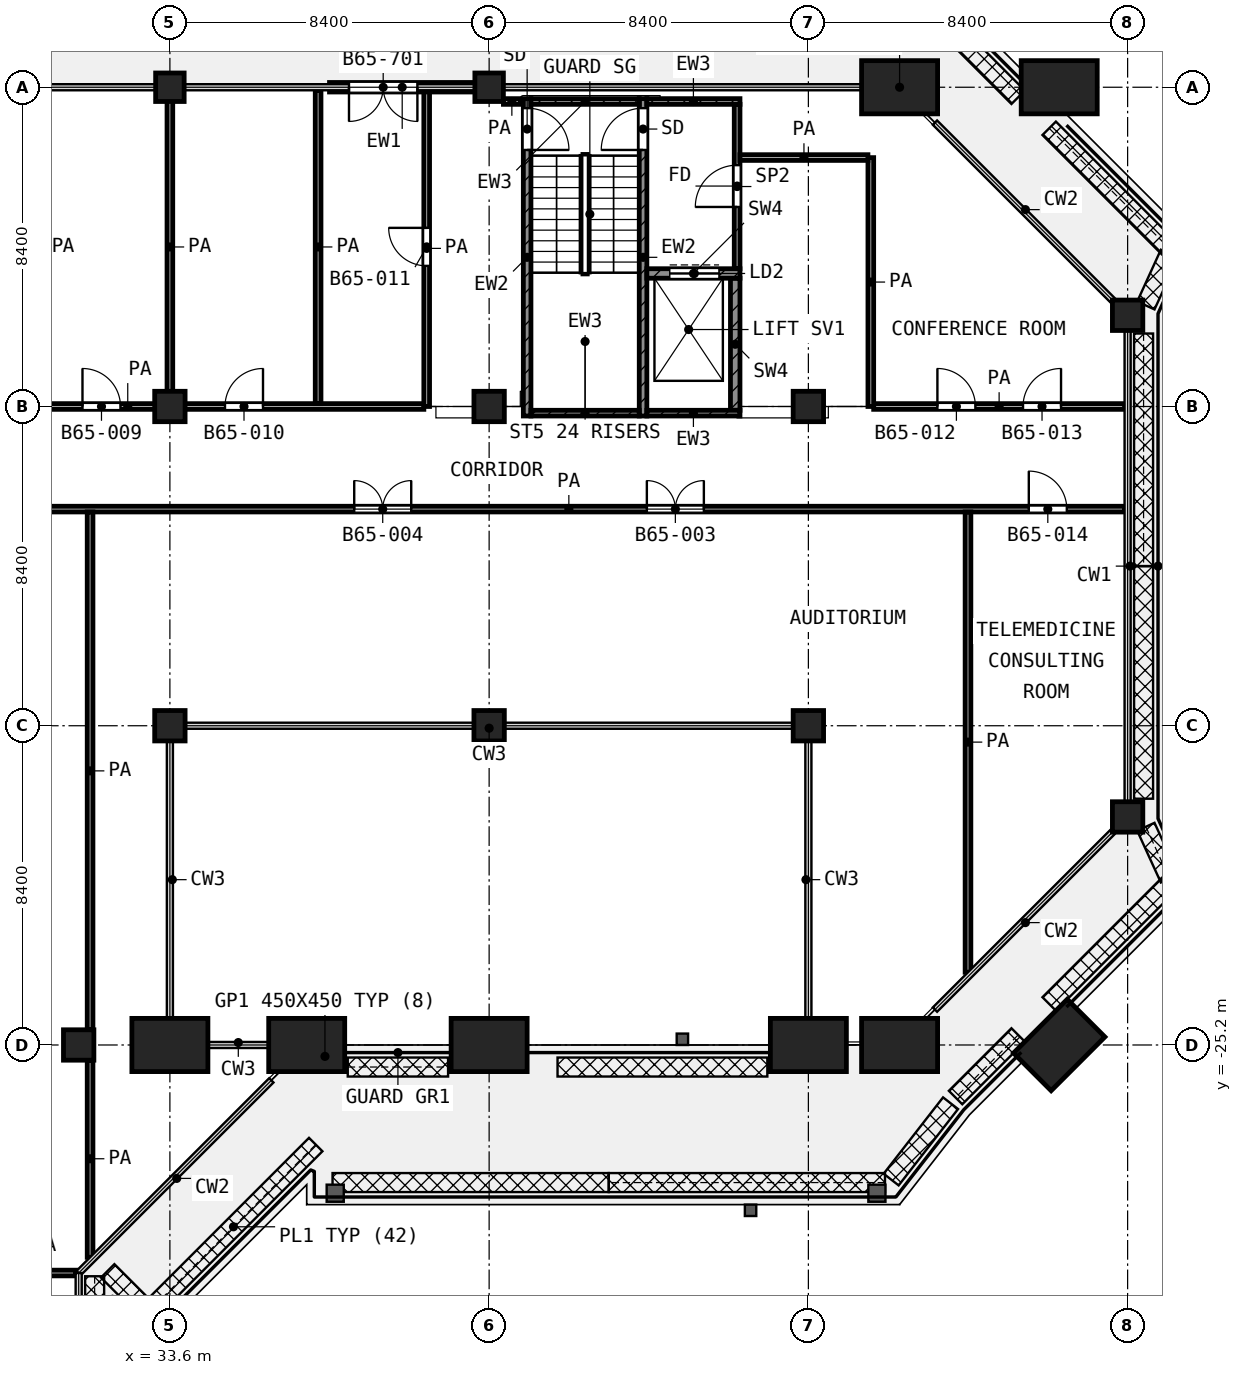
"""IFC4 building model, lengths in metres.
Left out: names, types, materials, properties, quantities, classifications, styles, units other than length and angle.
Written with IfcOpenShell. Run it as: python <this file> out.ifc"""

import sys

from ifc_helpers import new_model, si_unit, direction, frame, frame_2d, origin, origin_2d, place, context, subcontext, project, spatial, rectangle, extrude, element, fill, save


model = new_model("IFC4")
c1 = context("Model", 3, precision=1e-05, world=origin(), true_north=direction((0.0, 1.0)))
c2 = subcontext(c1, "Body", "Model", "MODEL_VIEW")
j1 = project(units=[si_unit("LENGTHUNIT", "METRE"), si_unit("PLANEANGLEUNIT", "RADIAN")], contexts=[c1])
p1 = place(None, origin())
s1 = spatial("IfcSite", under=j1, at=p1, CompositionType="ELEMENT")
p2 = place(p1, origin())
s2 = spatial("IfcBuilding", under=s1, at=p2, CompositionType="ELEMENT")
p3 = place(p2, frame((0.0, 0.0, 281.8)))
s3 = spatial("IfcBuildingStorey", under=s2, at=p3, CompositionType="ELEMENT", Elevation=281.8)
for number, where, z_axis, x_axis in (
    (1, (33.6, 0.0, 0.0), (0.0, 0.0, 1.0), (1.0, 0.0, 0.0)),
    (2, (42.0, 0.0, 0.0), (0.0, 0.0, 1.0), (1.0, 0.0, 0.0)),
):
    element("IfcColumn", number, at=place(p3, frame(where, z_axis=z_axis, x_axis=x_axis)), inside=s3, PredefinedType="COLUMN", context=c2, shape_type="SweptSolid", body=[
        extrude(rectangle(XDim=0.75, YDim=0.75, at=origin_2d()), origin(), (0.0, 0.0, 1.0), 4.2),
    ])
p4 = place(p3, frame((52.8, 0.0, 0.0), z_axis=(0.0, 0.0, 1.0), x_axis=(1.0, 0.0, 0.0)))
e3 = element("IfcColumn", 3, at=p4, inside=s3, PredefinedType="COLUMN", context=c2, shape_type="SweptSolid", body=[
    extrude(rectangle(XDim=2.0, YDim=1.4, at=origin_2d()), origin(), (0.0, 0.0, 1.0), 4.2),
])
for number, where, z_axis, x_axis in (
    (4, (58.8, -6.0, 0.0), (0.0, 0.0, 1.0), (1.0, 0.0, 0.0)),
    (5, (33.6, -8.4, 0.0), (0.0, 0.0, 1.0), (1.0, 0.0, 0.0)),
    (6, (42.0, -8.4, 0.0), (0.0, 0.0, 1.0), (1.0, 0.0, 0.0)),
    (7, (50.4, -8.4, 0.0), (0.0, 0.0, 1.0), (1.0, 0.0, 0.0)),
    (8, (33.6, -16.8, 0.0), (0.0, 0.0, 1.0), (1.0, 0.0, 0.0)),
    (9, (42.0, -16.8, 0.0), (0.0, 0.0, 1.0), (1.0, 0.0, 0.0)),
    (10, (50.4, -16.8, 0.0), (0.0, 0.0, 1.0), (1.0, 0.0, 0.0)),
    (11, (58.8, -19.2, 0.0), (0.0, 0.0, 1.0), (1.0, 0.0, 0.0)),
    (12, (31.2, -25.2, 0.0), (0.0, 0.0, 1.0), (1.0, 0.0, 0.0)),
):
    element("IfcColumn", number, at=place(p3, frame(where, z_axis=z_axis, x_axis=x_axis)), inside=s3, PredefinedType="COLUMN", context=c2, shape_type="SweptSolid", body=[
        extrude(rectangle(XDim=0.8, YDim=0.8, at=origin_2d()), origin(), (0.0, 0.0, 1.0), 4.2),
    ])
for number, where, z_axis, x_axis in (
    (13, (42.0, -25.2, 0.0), (0.0, 0.0, 1.0), (-1.0, 0.0, 0.0)),
    (14, (52.8, -25.2, 0.0), (0.0, 0.0, 1.0), (-1.0, 0.0, 0.0)),
    (15, (50.4, -25.2, 0.0), (0.0, 0.0, 1.0), (-1.0, 0.0, 0.0)),
    (16, (37.2, -25.2, 0.0), (0.0, 0.0, 1.0), (-1.0, 0.0, 0.0)),
    (17, (33.6, -25.2, 0.0), (0.0, 0.0, 1.0), (-1.0, 0.0, 0.0)),
    (18, (57.0, 0.0, 0.0), (0.0, 0.0, 1.0), (1.0, 0.0, 0.0)),
    (19, (57.0, -25.2, 0.0), (0.0, 0.0, 1.0), (-0.707, -0.707, 0.0)),
):
    element("IfcColumn", number, at=place(p3, frame(where, z_axis=z_axis, x_axis=x_axis)), inside=s3, PredefinedType="COLUMN", context=c2, shape_type="SweptSolid", body=[
        extrude(rectangle(XDim=2.0, YDim=1.4, at=origin_2d()), origin(), (0.0, 0.0, 1.0), 4.2),
    ])
p5 = place(p3, frame((41.625, 0.0, 0.0), z_axis=(0.0, 0.0, 1.0), x_axis=(-1.0, 0.0, 0.0)))
e20 = element("IfcWall", 20, at=p5, inside=s3, PredefinedType="SOLIDWALL", context=c2, shape_type="SweptSolid", body=[
    extrude(rectangle(XDim=3.825, YDim=0.25, at=frame_2d((1.913, 0.0))), origin(), (0.0, 0.0, 1.0), 3.48),
])
p6 = place(p5, frame((1.512, 0.0, 0.0)))
e21 = element("IfcOpeningElement", 21, at=p6, cuts=e20, PredefinedType="OPENING", context=c2, shape_type="SweptSolid", body=[
    extrude(rectangle(XDim=1.8, YDim=2.1, at=frame_2d((0.9, 1.05))), frame((0.0, 0.135, 0.0), z_axis=(0.0, -1.0, 0.0), x_axis=(1.0, 0.0, 0.0)), (0.0, 0.0, 1.0), 0.27),
])
p7 = place(p3, frame((43.0, -8.65, 0.0), z_axis=(0.0, 0.0, 1.0), x_axis=(0.0, 1.0, 0.0)))
e22 = element("IfcWall", 22, at=p7, inside=s3, PredefinedType="SHEAR", context=c2, shape_type="SweptSolid", body=[
    extrude(rectangle(XDim=8.35, YDim=0.2, at=frame_2d((4.175, 0.0))), origin(), (0.0, 0.0, 1.0), 3.6),
])
p8 = place(p7, frame((7.0, 0.0, 0.0)))
e23 = element("IfcOpeningElement", 23, at=p8, cuts=e22, PredefinedType="OPENING", context=c2, shape_type="SweptSolid", body=[
    extrude(rectangle(XDim=1.1, YDim=2.1, at=frame_2d((0.55, 1.05))), frame((0.0, 0.11, 0.0), z_axis=(0.0, -1.0, 0.0), x_axis=(1.0, 0.0, 0.0)), (0.0, 0.0, 1.0), 0.22),
])
p9 = place(p3, frame((46.05, -8.65, 0.0), z_axis=(0.0, 0.0, 1.0), x_axis=(0.0, 1.0, 0.0)))
e24 = element("IfcWall", 24, at=p9, inside=s3, PredefinedType="SHEAR", context=c2, shape_type="SweptSolid", body=[
    extrude(rectangle(XDim=8.35, YDim=0.2, at=frame_2d((4.175, 0.0))), origin(), (0.0, 0.0, 1.0), 3.6),
])
p10 = place(p9, frame((7.0, 0.0, 0.0)))
e25 = element("IfcOpeningElement", 25, at=p10, cuts=e24, PredefinedType="OPENING", context=c2, shape_type="SweptSolid", body=[
    extrude(rectangle(XDim=1.1, YDim=2.1, at=frame_2d((0.55, 1.05))), frame((0.0, 0.11, 0.0), z_axis=(0.0, -1.0, 0.0), x_axis=(1.0, 0.0, 0.0)), (0.0, 0.0, 1.0), 0.22),
])
p11 = place(p3, frame((43.1, -0.375, 0.0), z_axis=(0.0, 0.0, 1.0), x_axis=(1.0, 0.0, 0.0)))
e26 = element("IfcWall", 26, at=p11, inside=s3, PredefinedType="SHEAR", context=c2, shape_type="SweptSolid", body=[
    extrude(rectangle(XDim=2.85, YDim=0.15, at=frame_2d((1.425, 0.0))), origin(), (0.0, 0.0, 1.0), 3.6),
])
p12 = place(p3, frame((46.15, -0.375, 0.0), z_axis=(0.0, 0.0, 1.0), x_axis=(1.0, 0.0, 0.0)))
e27 = element("IfcWall", 27, at=p12, inside=s3, PredefinedType="SHEAR", context=c2, shape_type="SweptSolid", body=[
    extrude(rectangle(XDim=2.45, YDim=0.15, at=frame_2d((1.225, 0.0))), origin(), (0.0, 0.0, 1.0), 3.6),
])
p13 = place(p3, frame((43.1, -8.575, 0.0), z_axis=(0.0, 0.0, 1.0), x_axis=(1.0, 0.0, 0.0)))
e28 = element("IfcWall", 28, at=p13, inside=s3, PredefinedType="SHEAR", context=c2, shape_type="SweptSolid", body=[
    extrude(rectangle(XDim=2.85, YDim=0.15, at=frame_2d((1.425, 0.0))), origin(), (0.0, 0.0, 1.0), 3.6),
])
p14 = place(p3, frame((46.15, -8.575, 0.0), z_axis=(0.0, 0.0, 1.0), x_axis=(1.0, 0.0, 0.0)))
e29 = element("IfcWall", 29, at=p14, inside=s3, PredefinedType="SHEAR", context=c2, shape_type="SweptSolid", body=[
    extrude(rectangle(XDim=2.45, YDim=0.15, at=frame_2d((1.225, 0.0))), origin(), (0.0, 0.0, 1.0), 3.6),
])
p15 = place(p3, frame((46.15, -4.9, 0.0), z_axis=(0.0, 0.0, 1.0), x_axis=(1.0, 0.0, 0.0)))
e30 = element("IfcWall", 30, at=p15, inside=s3, PredefinedType="SHEAR", context=c2, shape_type="SweptSolid", body=[
    extrude(rectangle(XDim=2.45, YDim=0.25, at=frame_2d((1.225, 0.0))), origin(), (0.0, 0.0, 1.0), 3.6),
])
p16 = place(p15, frame((0.6, 0.0, 0.0)))
e31 = element("IfcOpeningElement", 31, at=p16, cuts=e30, PredefinedType="OPENING", context=c2, shape_type="SweptSolid", body=[
    extrude(rectangle(XDim=1.3, YDim=2.1, at=frame_2d((0.65, 1.05))), frame((0.0, 0.135, 0.0), z_axis=(0.0, -1.0, 0.0), x_axis=(1.0, 0.0, 0.0)), (0.0, 0.0, 1.0), 0.27),
])
p17 = place(p3, frame((48.475, -8.5, 0.0), z_axis=(0.0, 0.0, 1.0), x_axis=(0.0, 1.0, 0.0)))
e32 = element("IfcWall", 32, at=p17, inside=s3, PredefinedType="SHEAR", context=c2, shape_type="SweptSolid", body=[
    extrude(rectangle(XDim=3.475, YDim=0.25, at=frame_2d((1.738, 0.0))), origin(), (0.0, 0.0, 1.0), 3.6),
])
p18 = place(p3, frame((48.525, -4.775, 0.0), z_axis=(0.0, 0.0, 1.0), x_axis=(0.0, 1.0, 0.0)))
e33 = element("IfcWall", 33, at=p18, inside=s3, PredefinedType="PARTITIONING", context=c2, shape_type="SweptSolid", body=[
    extrude(rectangle(XDim=4.325, YDim=0.15, at=frame_2d((2.163, 0.0))), origin(), (0.0, 0.0, 1.0), 3.6),
])
p19 = place(p18, frame((1.625, 0.0, 0.0)))
e34 = element("IfcOpeningElement", 34, at=p19, cuts=e33, PredefinedType="OPENING", context=c2, shape_type="SweptSolid", body=[
    extrude(rectangle(XDim=1.1, YDim=2.1, at=frame_2d((0.55, 1.05))), frame((0.0, 0.085, 0.0), z_axis=(0.0, -1.0, 0.0), x_axis=(1.0, 0.0, 0.0)), (0.0, 0.0, 1.0), 0.17),
])
p20 = place(p3, frame((29.477, -31.2, 0.0), z_axis=(0.0, 0.0, 1.0), x_axis=(1.0, 0.0, 0.0)))
e35 = element("IfcWall", 35, at=p20, inside=s3, PredefinedType="PARTITIONING", context=c2, shape_type="SweptSolid", body=[
    extrude(rectangle(XDim=1.643, YDim=0.15, at=frame_2d((0.822, 0.0))), origin(), (0.0, 0.0, 1.0), 3.6),
])
p21 = place(p3, frame((29.475, -11.1, 0.0), z_axis=(0.0, 0.0, 1.0), x_axis=(1.0, 0.0, 0.0)))
e36 = element("IfcWall", 36, at=p21, inside=s3, PredefinedType="PARTITIONING", context=c2, shape_type="SweptSolid", body=[
    extrude(rectangle(XDim=29.245, YDim=0.15, at=frame_2d((14.623, 0.0))), origin(), (0.0, 0.0, 1.0), 3.6),
])
p22 = place(p21, frame((26.725, 0.0, 0.0)))
e37 = element("IfcOpeningElement", 37, at=p22, cuts=e36, PredefinedType="OPENING", context=c2, shape_type="SweptSolid", body=[
    extrude(rectangle(XDim=1.0, YDim=2.1, at=frame_2d((0.5, 1.05))), frame((0.0, 0.085, 0.0), z_axis=(0.0, -1.0, 0.0), x_axis=(1.0, 0.0, 0.0)), (0.0, 0.0, 1.0), 0.17),
])
p23 = place(p21, frame((16.675, 0.0, 0.0)))
e38 = element("IfcOpeningElement", 38, at=p23, cuts=e36, PredefinedType="OPENING", context=c2, shape_type="SweptSolid", body=[
    extrude(rectangle(XDim=1.5, YDim=2.1, at=frame_2d((0.75, 1.05))), frame((0.0, 0.085, 0.0), z_axis=(0.0, -1.0, 0.0), x_axis=(1.0, 0.0, 0.0)), (0.0, 0.0, 1.0), 0.17),
])
p24 = place(p21, frame((8.975, 0.0, 0.0)))
e39 = element("IfcOpeningElement", 39, at=p24, cuts=e36, PredefinedType="OPENING", context=c2, shape_type="SweptSolid", body=[
    extrude(rectangle(XDim=1.5, YDim=2.1, at=frame_2d((0.75, 1.05))), frame((0.0, 0.085, 0.0), z_axis=(0.0, -1.0, 0.0), x_axis=(1.0, 0.0, 0.0)), (0.0, 0.0, 1.0), 0.17),
])
p25 = place(p3, frame((24.7, -8.4, 0.0), z_axis=(0.0, 0.0, 1.0), x_axis=(1.0, 0.0, 0.0)))
e40 = element("IfcWall", 40, at=p25, inside=s3, PredefinedType="PARTITIONING", context=c2, shape_type="SweptSolid", body=[
    extrude(rectangle(XDim=15.582, YDim=0.15, at=frame_2d((7.791, 0.0))), origin(), (0.0, 0.0, 1.0), 3.6),
])
p26 = place(p25, frame((2.3, 0.0, 0.0)))
e41 = element("IfcOpeningElement", 41, at=p26, cuts=e40, PredefinedType="OPENING", context=c2, shape_type="SweptSolid", body=[
    extrude(rectangle(XDim=1.2, YDim=2.1, at=frame_2d((0.6, 1.05))), frame((0.0, 0.085, 0.0), z_axis=(0.0, -1.0, 0.0), x_axis=(1.0, 0.0, 0.0)), (0.0, 0.0, 1.0), 0.17),
])
p27 = place(p25, frame((6.6, 0.0, 0.0)))
e42 = element("IfcOpeningElement", 42, at=p27, cuts=e40, PredefinedType="OPENING", context=c2, shape_type="SweptSolid", body=[
    extrude(rectangle(XDim=1.0, YDim=2.1, at=frame_2d((0.5, 1.05))), frame((0.0, 0.085, 0.0), z_axis=(0.0, -1.0, 0.0), x_axis=(1.0, 0.0, 0.0)), (0.0, 0.0, 1.0), 0.17),
])
p28 = place(p25, frame((10.35, 0.0, 0.0)))
e43 = element("IfcOpeningElement", 43, at=p28, cuts=e40, PredefinedType="OPENING", context=c2, shape_type="SweptSolid", body=[
    extrude(rectangle(XDim=1.0, YDim=2.1, at=frame_2d((0.5, 1.05))), frame((0.0, 0.085, 0.0), z_axis=(0.0, -1.0, 0.0), x_axis=(1.0, 0.0, 0.0)), (0.0, 0.0, 1.0), 0.17),
])
p29 = place(p3, frame((52.118, -8.4, 0.0), z_axis=(0.0, 0.0, 1.0), x_axis=(1.0, 0.0, 0.0)))
e44 = element("IfcWall", 44, at=p29, inside=s3, PredefinedType="PARTITIONING", context=c2, shape_type="SweptSolid", body=[
    extrude(rectangle(XDim=6.602, YDim=0.15, at=frame_2d((3.301, 0.0))), origin(), (0.0, 0.0, 1.0), 3.6),
])
p30 = place(p29, frame((1.677, 0.0, 0.0)))
e45 = element("IfcOpeningElement", 45, at=p30, cuts=e44, PredefinedType="OPENING", context=c2, shape_type="SweptSolid", body=[
    extrude(rectangle(XDim=1.0, YDim=2.1, at=frame_2d((0.5, 1.05))), frame((0.0, 0.085, 0.0), z_axis=(0.0, -1.0, 0.0), x_axis=(1.0, 0.0, 0.0)), (0.0, 0.0, 1.0), 0.17),
])
p31 = place(p29, frame((3.93, 0.0, 0.0)))
e46 = element("IfcOpeningElement", 46, at=p31, cuts=e44, PredefinedType="OPENING", context=c2, shape_type="SweptSolid", body=[
    extrude(rectangle(XDim=1.0, YDim=2.1, at=frame_2d((0.5, 1.05))), frame((0.0, 0.085, 0.0), z_axis=(0.0, -1.0, 0.0), x_axis=(1.0, 0.0, 0.0)), (0.0, 0.0, 1.0), 0.17),
])
p32 = place(p3, frame((48.6, -1.85, 0.0), z_axis=(0.0, 0.0, 1.0), x_axis=(1.0, 0.0, 0.0)))
e47 = element("IfcWall", 47, at=p32, inside=s3, PredefinedType="PARTITIONING", context=c2, shape_type="SweptSolid", body=[
    extrude(rectangle(XDim=3.367, YDim=0.15, at=frame_2d((1.684, 0.0))), origin(), (0.0, 0.0, 1.0), 3.6),
])
p33 = place(p3, frame((42.376, -0.375, 0.0), z_axis=(0.0, 0.0, 1.0), x_axis=(1.0, 0.0, 0.0)))
e48 = element("IfcWall", 48, at=p33, inside=s3, PredefinedType="PARTITIONING", context=c2, shape_type="SweptSolid", body=[
    extrude(rectangle(XDim=0.444, YDim=0.15, at=frame_2d((0.222, 0.0))), origin(), (0.0, 0.0, 1.0), 3.6),
])
p34 = place(p3, frame((31.5, -30.787, 0.0), z_axis=(0.0, 0.0, 1.0), x_axis=(0.0, 1.0, 0.0)))
e49 = element("IfcWall", 49, at=p34, inside=s3, PredefinedType="PARTITIONING", context=c2, shape_type="SweptSolid", body=[
    extrude(rectangle(XDim=5.187, YDim=0.15, at=frame_2d((2.594, 0.0))), origin(), (0.0, 0.0, 1.0), 3.6),
])
p35 = place(p3, frame((31.5, -24.8, 0.0), z_axis=(0.0, 0.0, 1.0), x_axis=(0.0, 1.0, 0.0)))
e50 = element("IfcWall", 50, at=p35, inside=s3, PredefinedType="PARTITIONING", context=c2, shape_type="SweptSolid", body=[
    extrude(rectangle(XDim=13.625, YDim=0.15, at=frame_2d((6.812, 0.0))), origin(), (0.0, 0.0, 1.0), 3.6),
])
for number, where, z_axis, x_axis in (
    (51, (33.6, -8.325, 0.0), (0.0, 0.0, 1.0), (0.0, 1.0, 0.0)),
    (52, (37.5, -8.325, 0.0), (0.0, 0.0, 1.0), (0.0, 1.0, 0.0)),
):
    element("IfcWall", number, at=place(p3, frame(where, z_axis=z_axis, x_axis=x_axis)), inside=s3, PredefinedType="PARTITIONING", context=c2, shape_type="SweptSolid", body=[
        extrude(rectangle(XDim=8.245, YDim=0.15, at=frame_2d((4.123, 0.0))), origin(), (0.0, 0.0, 1.0), 3.6),
    ])
p36 = place(p3, frame((40.357, -8.4, 0.0), z_axis=(0.0, 0.0, 1.0), x_axis=(0.0, 1.0, 0.0)))
e53 = element("IfcWall", 53, at=p36, inside=s3, PredefinedType="PARTITIONING", context=c2, shape_type="SweptSolid", body=[
    extrude(rectangle(XDim=8.32, YDim=0.15, at=frame_2d((4.16, 0.0))), origin(), (0.0, 0.0, 1.0), 3.6),
])
p37 = place(p36, frame((3.7, 0.0, 0.0)))
e54 = element("IfcOpeningElement", 54, at=p37, cuts=e53, PredefinedType="OPENING", context=c2, shape_type="SweptSolid", body=[
    extrude(rectangle(XDim=1.0, YDim=2.1, at=frame_2d((0.5, 1.05))), frame((0.0, 0.085, 0.0), z_axis=(0.0, -1.0, 0.0), x_axis=(1.0, 0.0, 0.0)), (0.0, 0.0, 1.0), 0.17),
])
p38 = place(p3, frame((52.043, -8.4, 0.0), z_axis=(0.0, 0.0, 1.0), x_axis=(0.0, 1.0, 0.0)))
e55 = element("IfcWall", 55, at=p38, inside=s3, PredefinedType="PARTITIONING", context=c2, shape_type="SweptSolid", body=[
    extrude(rectangle(XDim=6.548, YDim=0.15, at=frame_2d((3.274, 0.0))), origin(), (0.0, 0.0, 1.0), 3.6),
])
p39 = place(p3, frame((54.6, -23.287, 0.0), z_axis=(0.0, 0.0, 1.0), x_axis=(0.0, 1.0, 0.0)))
e56 = element("IfcWall", 56, at=p39, inside=s3, PredefinedType="PARTITIONING", context=c2, shape_type="SweptSolid", body=[
    extrude(rectangle(XDim=12.112, YDim=0.15, at=frame_2d((6.056, 0.0))), origin(), (0.0, 0.0, 1.0), 3.6),
])
p40 = place(p6, origin())
e57 = element("IfcDoor", 57, at=p40, inside=s3, OperationType="DOUBLE_DOOR_SINGLE_SWING", PredefinedType="DOOR", context=c2, shape_type="SweptSolid", body=[
    extrude(rectangle(XDim=1.8, YDim=2.1, at=frame_2d((0.9, 1.05))), frame((0.0, 0.025, 0.0), z_axis=(0.0, -1.0, 0.0), x_axis=(1.0, 0.0, 0.0)), (0.0, 0.0, 1.0), 0.05),
])
fill(e21, e57)
p41 = place(p8, frame((1.1, 0.0, 0.0), z_axis=(0.0, 0.0, 1.0), x_axis=(-1.0, 0.0, 0.0)))
e58 = element("IfcDoor", 58, at=p41, inside=s3, OperationType="SINGLE_SWING_LEFT", PredefinedType="DOOR", context=c2, shape_type="SweptSolid", body=[
    extrude(rectangle(XDim=1.1, YDim=2.1, at=frame_2d((0.55, 1.05))), frame((0.0, 0.025, 0.0), z_axis=(0.0, -1.0, 0.0), x_axis=(1.0, 0.0, 0.0)), (0.0, 0.0, 1.0), 0.05),
])
fill(e23, e58)
p42 = place(p10, origin())
e59 = element("IfcDoor", 59, at=p42, inside=s3, OperationType="SINGLE_SWING_LEFT", PredefinedType="DOOR", context=c2, shape_type="SweptSolid", body=[
    extrude(rectangle(XDim=1.1, YDim=2.1, at=frame_2d((0.55, 1.05))), frame((0.0, 0.025, 0.0), z_axis=(0.0, -1.0, 0.0), x_axis=(1.0, 0.0, 0.0)), (0.0, 0.0, 1.0), 0.05),
])
fill(e25, e59)
p43 = place(p16, origin())
e60 = element("IfcDoor", 60, at=p43, inside=s3, OperationType="DOUBLE_DOOR_SLIDING", PredefinedType="DOOR", context=c2, shape_type="SweptSolid", body=[
    extrude(rectangle(XDim=1.3, YDim=2.1, at=frame_2d((0.65, 1.05))), frame((0.0, 0.025, 0.0), z_axis=(0.0, -1.0, 0.0), x_axis=(1.0, 0.0, 0.0)), (0.0, 0.0, 1.0), 0.05),
])
fill(e31, e60)
p44 = place(p19, origin())
e61 = element("IfcDoor", 61, at=p44, inside=s3, OperationType="SINGLE_SWING_LEFT", PredefinedType="DOOR", context=c2, shape_type="SweptSolid", body=[
    extrude(rectangle(XDim=1.1, YDim=2.1, at=frame_2d((0.55, 1.05))), frame((0.0, 0.025, 0.0), z_axis=(0.0, -1.0, 0.0), x_axis=(1.0, 0.0, 0.0)), (0.0, 0.0, 1.0), 0.05),
])
fill(e34, e61)
p45 = place(p27, origin())
e62 = element("IfcDoor", 62, at=p45, inside=s3, OperationType="SINGLE_SWING_LEFT", PredefinedType="DOOR", context=c2, shape_type="SweptSolid", body=[
    extrude(rectangle(XDim=1.0, YDim=2.1, at=frame_2d((0.5, 1.05))), frame((0.0, 0.025, 0.0), z_axis=(0.0, -1.0, 0.0), x_axis=(1.0, 0.0, 0.0)), (0.0, 0.0, 1.0), 0.05),
])
fill(e42, e62)
p46 = place(p28, origin())
e63 = element("IfcDoor", 63, at=p46, inside=s3, OperationType="SINGLE_SWING_RIGHT", PredefinedType="DOOR", context=c2, shape_type="SweptSolid", body=[
    extrude(rectangle(XDim=1.0, YDim=2.1, at=frame_2d((0.5, 1.05))), frame((0.0, 0.025, 0.0), z_axis=(0.0, -1.0, 0.0), x_axis=(1.0, 0.0, 0.0)), (0.0, 0.0, 1.0), 0.05),
])
fill(e43, e63)
p47 = place(p37, origin())
e64 = element("IfcDoor", 64, at=p47, inside=s3, OperationType="SINGLE_SWING_RIGHT", PredefinedType="DOOR", context=c2, shape_type="SweptSolid", body=[
    extrude(rectangle(XDim=1.0, YDim=2.1, at=frame_2d((0.5, 1.05))), frame((0.0, 0.025, 0.0), z_axis=(0.0, -1.0, 0.0), x_axis=(1.0, 0.0, 0.0)), (0.0, 0.0, 1.0), 0.05),
])
fill(e54, e64)
p48 = place(p30, origin())
e65 = element("IfcDoor", 65, at=p48, inside=s3, OperationType="SINGLE_SWING_LEFT", PredefinedType="DOOR", context=c2, shape_type="SweptSolid", body=[
    extrude(rectangle(XDim=1.0, YDim=2.1, at=frame_2d((0.5, 1.05))), frame((0.0, 0.025, 0.0), z_axis=(0.0, -1.0, 0.0), x_axis=(1.0, 0.0, 0.0)), (0.0, 0.0, 1.0), 0.05),
])
fill(e45, e65)
p49 = place(p31, origin())
e66 = element("IfcDoor", 66, at=p49, inside=s3, OperationType="SINGLE_SWING_RIGHT", PredefinedType="DOOR", context=c2, shape_type="SweptSolid", body=[
    extrude(rectangle(XDim=1.0, YDim=2.1, at=frame_2d((0.5, 1.05))), frame((0.0, 0.025, 0.0), z_axis=(0.0, -1.0, 0.0), x_axis=(1.0, 0.0, 0.0)), (0.0, 0.0, 1.0), 0.05),
])
fill(e46, e66)
p50 = place(p22, origin())
e67 = element("IfcDoor", 67, at=p50, inside=s3, OperationType="SINGLE_SWING_LEFT", PredefinedType="DOOR", context=c2, shape_type="SweptSolid", body=[
    extrude(rectangle(XDim=1.0, YDim=2.1, at=frame_2d((0.5, 1.05))), frame((0.0, 0.025, 0.0), z_axis=(0.0, -1.0, 0.0), x_axis=(1.0, 0.0, 0.0)), (0.0, 0.0, 1.0), 0.05),
])
fill(e37, e67)
p51 = place(p23, origin())
e68 = element("IfcDoor", 68, at=p51, inside=s3, OperationType="DOUBLE_DOOR_SINGLE_SWING", PredefinedType="DOOR", context=c2, shape_type="SweptSolid", body=[
    extrude(rectangle(XDim=1.5, YDim=2.1, at=frame_2d((0.75, 1.05))), frame((0.0, 0.025, 0.0), z_axis=(0.0, -1.0, 0.0), x_axis=(1.0, 0.0, 0.0)), (0.0, 0.0, 1.0), 0.05),
])
fill(e38, e68)
p52 = place(p24, origin())
e69 = element("IfcDoor", 69, at=p52, inside=s3, OperationType="DOUBLE_DOOR_SINGLE_SWING", PredefinedType="DOOR", context=c2, shape_type="SweptSolid", body=[
    extrude(rectangle(XDim=1.5, YDim=2.1, at=frame_2d((0.75, 1.05))), frame((0.0, 0.025, 0.0), z_axis=(0.0, -1.0, 0.0), x_axis=(1.0, 0.0, 0.0)), (0.0, 0.0, 1.0), 0.05),
])
fill(e39, e69)
save(model, sys.argv[1])
